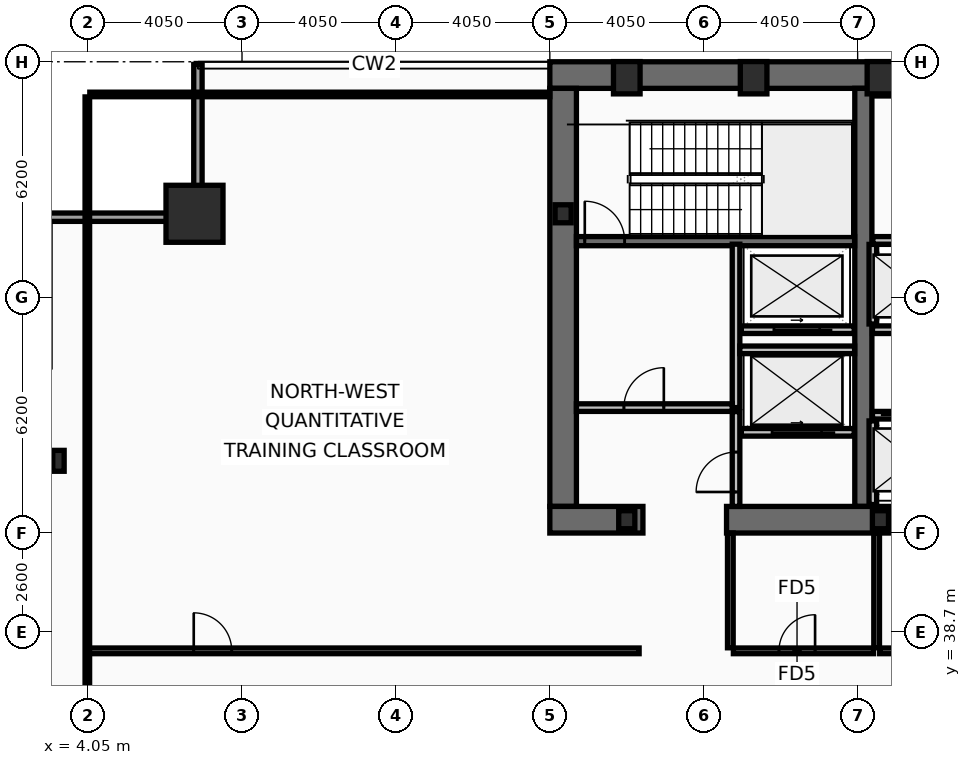
"""IFC4 building model, lengths in metres.
Left out: names, types, materials, properties, quantities, classifications, styles, units other than length and angle.
Written with IfcOpenShell. Run it as: python <this file> out.ifc"""

import sys

from ifc_helpers import new_model, si_unit, direction, frame, frame_2d, origin, origin_2d, place, context, subcontext, project, spatial, rectangle, hollow_rectangle, i_section, extrude, element, fill, save


model = new_model("IFC4")
c1 = context("Model", 3, precision=1e-05, world=origin(), true_north=direction((0.0, 1.0)))
c2 = subcontext(c1, "Body", "Model", "MODEL_VIEW")
j1 = project(units=[si_unit("LENGTHUNIT", "METRE"), si_unit("PLANEANGLEUNIT", "RADIAN")], contexts=[c1])
p1 = place(None, origin())
s1 = spatial("IfcSite", under=j1, at=p1, CompositionType="ELEMENT")
p2 = place(p1, origin())
s2 = spatial("IfcBuilding", under=s1, at=p2, CompositionType="ELEMENT")
p3 = place(p2, frame((0.0, 0.0, 106.6)))
s3 = spatial("IfcBuildingStorey", under=s2, at=p3, CompositionType="ELEMENT", Elevation=106.6)
p4 = place(p3, frame((16.2, 53.35, 0.0), z_axis=(0.0, 0.0, 1.0), x_axis=(1.0, 0.0, 0.0)))
e1 = element("IfcWall", 1, at=p4, inside=s3, PredefinedType="SHEAR", context=c2, shape_type="SweptSolid", body=[
    extrude(rectangle(XDim=40.5, YDim=0.7, at=frame_2d((20.25, 0.0))), origin(), (0.0, 0.0, 1.0), 4.24),
])
p5 = place(p3, frame((16.55, 42.0, 0.0), z_axis=(0.0, 0.0, 1.0), x_axis=(0.0, 1.0, 0.0)))
e2 = element("IfcWall", 2, at=p5, inside=s3, PredefinedType="SHEAR", context=c2, shape_type="SweptSolid", body=[
    extrude(rectangle(XDim=11.0, YDim=0.7, at=frame_2d((5.5, 0.0))), origin(), (0.0, 0.0, 1.0), 4.24),
])
p6 = place(p3, frame((24.45, 42.0, 0.0), z_axis=(0.0, 0.0, 1.0), x_axis=(0.0, 1.0, 0.0)))
e3 = element("IfcWall", 3, at=p6, inside=s3, PredefinedType="SHEAR", context=c2, shape_type="SweptSolid", body=[
    extrude(rectangle(XDim=11.0, YDim=0.45, at=frame_2d((5.5, 0.0))), origin(), (0.0, 0.0, 1.0), 4.24),
])
p7 = place(p3, frame((18.65, 41.65, 0.0), z_axis=(0.0, 0.0, 1.0), x_axis=(-1.0, 0.0, 0.0)))
e4 = element("IfcWall", 4, at=p7, inside=s3, PredefinedType="SHEAR", context=c2, shape_type="SweptSolid", body=[
    extrude(rectangle(XDim=2.45, YDim=0.7, at=frame_2d((1.225, 0.0))), origin(), (0.0, 0.0, 1.0), 4.24),
])
p8 = place(p3, frame((32.3, 41.65, 0.0), z_axis=(0.0, 0.0, 1.0), x_axis=(-1.0, 0.0, 0.0)))
e5 = element("IfcWall", 5, at=p8, inside=s3, PredefinedType="SHEAR", context=c2, shape_type="SweptSolid", body=[
    extrude(rectangle(XDim=11.45, YDim=0.7, at=frame_2d((5.725, 0.0))), origin(), (0.0, 0.0, 1.0), 4.24),
])
p9 = place(p3, frame((16.9, 48.98, 0.0), z_axis=(0.0, 0.0, 1.0), x_axis=(1.0, 0.0, 0.0)))
e6 = element("IfcWall", 6, at=p9, inside=s3, PredefinedType="SHEAR", context=c2, shape_type="SweptSolid", body=[
    extrude(rectangle(XDim=7.32, YDim=0.24, at=frame_2d((3.66, 0.0))), origin(), (0.0, 0.0, 1.0), 4.24),
])
p10 = place(p9, frame((0.22, 0.0, 0.0)))
e7 = element("IfcOpeningElement", 7, at=p10, cuts=e6, PredefinedType="OPENING", context=c2, shape_type="SweptSolid", body=[
    extrude(rectangle(XDim=1.05, YDim=2.15, at=frame_2d((0.525, 1.075))), frame((0.0, 0.13, 0.0), z_axis=(0.0, -1.0, 0.0), x_axis=(1.0, 0.0, 0.0)), (0.0, 0.0, 1.0), 0.26),
])
p11 = place(p3, frame((6.85, 49.7, 0.0), z_axis=(0.0, 0.0, 1.0), x_axis=(1.0, 0.0, 0.0)))
e8 = element("IfcColumn", 8, at=p11, inside=s3, PredefinedType="COLUMN", context=c2, shape_type="SweptSolid", body=[
    extrude(hollow_rectangle(XDim=1.5, YDim=1.5, WallThickness=0.07, at=origin_2d()), origin(), (0.0, 0.0, 1.0), 4.4),
])
for number, where, z_axis, x_axis in (
    (9, (18.225, 53.28, 0.0), (0.0, 0.0, 1.0), (1.0, 0.0, 0.0)),
    (10, (21.562, 53.28, 0.0), (0.0, 0.0, 1.0), (1.0, 0.0, 0.0)),
    (11, (24.9, 53.28, 0.0), (0.0, 0.0, 1.0), (1.0, 0.0, 0.0)),
):
    element("IfcColumn", number, at=place(p3, frame(where, z_axis=z_axis, x_axis=x_axis)), inside=s3, PredefinedType="COLUMN", context=c2, shape_type="SweptSolid", body=[
        extrude(hollow_rectangle(XDim=0.7, YDim=0.85, WallThickness=0.05, at=origin_2d()), origin(), (0.0, 0.0, 1.0), 4.4),
    ])
p12 = place(p3, frame((3.27, 43.2, 0.0), z_axis=(0.0, 0.0, 1.0), x_axis=(1.0, 0.0, 0.0)))
e12 = element("IfcColumn", 12, at=p12, inside=s3, PredefinedType="COLUMN", context=c2, shape_type="SweptSolid", body=[
    extrude(i_section(OverallWidth=0.3, OverallDepth=0.55, WebThickness=0.015, FlangeThickness=0.029, at=origin_2d()), origin(), (0.0, 0.0, 1.0), 4.4),
])
for number, where, z_axis, x_axis in (
    (13, (16.55, 49.7, 0.0), (0.0, 0.0, 1.0), (1.0, 0.0, 0.0)),
    (14, (18.225, 41.65, 0.0), (0.0, 0.0, 1.0), (1.0, 0.0, 0.0)),
    (15, (24.9, 41.65, 0.0), (0.0, 0.0, 1.0), (1.0, 0.0, 0.0)),
):
    element("IfcColumn", number, at=place(p3, frame(where, z_axis=z_axis, x_axis=x_axis)), inside=s3, PredefinedType="COLUMN", context=c2, shape_type="SweptSolid", body=[
        extrude(i_section(OverallWidth=0.424, OverallDepth=0.474, WebThickness=0.048, FlangeThickness=0.077, at=origin_2d()), origin(), (0.0, 0.0, 1.0), 4.4),
    ])
p13 = place(p3, frame((2.83, 49.61, 0.0), z_axis=(0.0, 0.0, 1.0), x_axis=(1.0, 0.0, 0.0)))
e16 = element("IfcWall", 16, at=p13, inside=s3, PredefinedType="SOLIDWALL", context=c2, shape_type="SweptSolid", body=[
    extrude(rectangle(XDim=4.22, YDim=0.22, at=frame_2d((2.11, 0.0))), origin(), (0.0, 0.0, 1.0), 3.63),
])
p14 = place(p3, frame((6.94, 49.72, 0.0), z_axis=(0.0, 0.0, 1.0), x_axis=(0.0, 1.0, 0.0)))
e17 = element("IfcWall", 17, at=p14, inside=s3, PredefinedType="SOLIDWALL", context=c2, shape_type="SweptSolid", body=[
    extrude(rectangle(XDim=3.91, YDim=0.22, at=frame_2d((1.955, 0.0))), origin(), (0.0, 0.0, 1.0), 3.63),
])
p15 = place(p3, frame((24.69, 44.4, 0.0), z_axis=(0.0, 0.0, 1.0), x_axis=(1.0, 0.0, 0.0)))
e18 = element("IfcWall", 18, at=p15, inside=s3, PredefinedType="PARTITIONING", context=c2, shape_type="SweptSolid", body=[
    extrude(rectangle(XDim=6.53, YDim=0.2, at=frame_2d((3.265, 0.0))), origin(), (0.0, 0.0, 1.0), 4.24),
])
p16 = place(p15, frame((0.53, 0.0, 0.0)))
e19 = element("IfcOpeningElement", 19, at=p16, cuts=e18, PredefinedType="OPENING", context=c2, shape_type="SweptSolid", body=[
    extrude(rectangle(XDim=1.1, YDim=2.18, at=frame_2d((0.55, 1.09))), frame((0.0, 0.11, 0.0), z_axis=(0.0, -1.0, 0.0), x_axis=(1.0, 0.0, 0.0)), (0.0, 0.0, 1.0), 0.22),
])
p17 = place(p15, frame((2.69, 0.0, 0.0)))
e20 = element("IfcOpeningElement", 20, at=p17, cuts=e18, PredefinedType="OPENING", context=c2, shape_type="SweptSolid", body=[
    extrude(rectangle(XDim=1.1, YDim=2.18, at=frame_2d((0.55, 1.09))), frame((0.0, 0.11, 0.0), z_axis=(0.0, -1.0, 0.0), x_axis=(1.0, 0.0, 0.0)), (0.0, 0.0, 1.0), 0.22),
])
p18 = place(p15, frame((4.85, 0.0, 0.0)))
e21 = element("IfcOpeningElement", 21, at=p18, cuts=e18, PredefinedType="OPENING", context=c2, shape_type="SweptSolid", body=[
    extrude(rectangle(XDim=1.1, YDim=2.18, at=frame_2d((0.55, 1.09))), frame((0.0, 0.11, 0.0), z_axis=(0.0, -1.0, 0.0), x_axis=(1.0, 0.0, 0.0)), (0.0, 0.0, 1.0), 0.22),
])
p19 = place(p3, frame((24.21, 43.95, 0.0), z_axis=(0.0, 0.0, 1.0), x_axis=(-1.0, 0.0, 0.0)))
e22 = element("IfcWall", 22, at=p19, inside=s3, PredefinedType="PARTITIONING", context=c2, shape_type="SweptSolid", body=[
    extrude(rectangle(XDim=2.97, YDim=0.2, at=frame_2d((1.485, 0.0))), origin(), (0.0, 0.0, 1.0), 4.24),
])
p20 = place(p19, frame((0.86, 0.0, 0.0)))
e23 = element("IfcOpeningElement", 23, at=p20, cuts=e22, PredefinedType="OPENING", context=c2, shape_type="SweptSolid", body=[
    extrude(rectangle(XDim=1.3, YDim=2.18, at=frame_2d((0.65, 1.09))), frame((0.0, 0.11, 0.0), z_axis=(0.0, -1.0, 0.0), x_axis=(1.0, 0.0, 0.0)), (0.0, 0.0, 1.0), 0.22),
])
p21 = place(p3, frame((24.21, 46.65, 0.0), z_axis=(0.0, 0.0, 1.0), x_axis=(-1.0, 0.0, 0.0)))
e24 = element("IfcWall", 24, at=p21, inside=s3, PredefinedType="PARTITIONING", context=c2, shape_type="SweptSolid", body=[
    extrude(rectangle(XDim=2.97, YDim=0.2, at=frame_2d((1.485, 0.0))), origin(), (0.0, 0.0, 1.0), 4.24),
])
p22 = place(p21, frame((0.91, 0.0, 0.0)))
e25 = element("IfcOpeningElement", 25, at=p22, cuts=e24, PredefinedType="OPENING", context=c2, shape_type="SweptSolid", body=[
    extrude(rectangle(XDim=1.2, YDim=2.18, at=frame_2d((0.6, 1.09))), frame((0.0, 0.11, 0.0), z_axis=(0.0, -1.0, 0.0), x_axis=(1.0, 0.0, 0.0)), (0.0, 0.0, 1.0), 0.22),
])
p23 = place(p3, frame((31.22, 46.65, 0.0), z_axis=(0.0, 0.0, 1.0), x_axis=(-1.0, 0.0, 0.0)))
e26 = element("IfcWall", 26, at=p23, inside=s3, PredefinedType="PARTITIONING", context=c2, shape_type="SweptSolid", body=[
    extrude(rectangle(XDim=6.53, YDim=0.2, at=frame_2d((3.265, 0.0))), origin(), (0.0, 0.0, 1.0), 4.24),
])
p24 = place(p23, frame((4.9, 0.0, 0.0)))
e27 = element("IfcOpeningElement", 27, at=p24, cuts=e26, PredefinedType="OPENING", context=c2, shape_type="SweptSolid", body=[
    extrude(rectangle(XDim=1.1, YDim=2.18, at=frame_2d((0.55, 1.09))), frame((0.0, 0.11, 0.0), z_axis=(0.0, -1.0, 0.0), x_axis=(1.0, 0.0, 0.0)), (0.0, 0.0, 1.0), 0.22),
])
p25 = place(p23, frame((2.74, 0.0, 0.0)))
e28 = element("IfcOpeningElement", 28, at=p25, cuts=e26, PredefinedType="OPENING", context=c2, shape_type="SweptSolid", body=[
    extrude(rectangle(XDim=1.1, YDim=2.18, at=frame_2d((0.55, 1.09))), frame((0.0, 0.11, 0.0), z_axis=(0.0, -1.0, 0.0), x_axis=(1.0, 0.0, 0.0)), (0.0, 0.0, 1.0), 0.22),
])
p26 = place(p23, frame((0.58, 0.0, 0.0)))
e29 = element("IfcOpeningElement", 29, at=p26, cuts=e26, PredefinedType="OPENING", context=c2, shape_type="SweptSolid", body=[
    extrude(rectangle(XDim=1.1, YDim=2.18, at=frame_2d((0.55, 1.09))), frame((0.0, 0.11, 0.0), z_axis=(0.0, -1.0, 0.0), x_axis=(1.0, 0.0, 0.0)), (0.0, 0.0, 1.0), 0.22),
])
p27 = place(p3, frame((21.1, 44.6, 0.0), z_axis=(0.0, 0.0, 1.0), x_axis=(0.0, 1.0, 0.0)))
e30 = element("IfcWall", 30, at=p27, inside=s3, PredefinedType="PARTITIONING", context=c2, shape_type="SweptSolid", body=[
    extrude(rectangle(XDim=4.3, YDim=0.2, at=frame_2d((2.15, 0.0))), origin(), (0.0, 0.0, 1.0), 4.24),
])
p28 = place(p3, frame((16.9, 44.6, 0.0), z_axis=(0.0, 0.0, 1.0), x_axis=(1.0, 0.0, 0.0)))
e31 = element("IfcWall", 31, at=p28, inside=s3, PredefinedType="PARTITIONING", context=c2, shape_type="SweptSolid", body=[
    extrude(rectangle(XDim=4.1, YDim=0.2, at=frame_2d((2.05, 0.0))), origin(), (0.0, 0.0, 1.0), 4.24),
])
p29 = place(p28, frame((1.25, 0.0, 0.0)))
e32 = element("IfcOpeningElement", 32, at=p29, cuts=e31, PredefinedType="OPENING", context=c2, shape_type="SweptSolid", body=[
    extrude(rectangle(XDim=1.05, YDim=2.15, at=frame_2d((0.525, 1.075))), frame((0.0, 0.11, 0.0), z_axis=(0.0, -1.0, 0.0), x_axis=(1.0, 0.0, 0.0)), (0.0, 0.0, 1.0), 0.22),
])
p30 = place(p3, frame((21.2, 46.12, 0.0), z_axis=(0.0, 0.0, 1.0), x_axis=(1.0, 0.0, 0.0)))
e33 = element("IfcWall", 33, at=p30, inside=s3, PredefinedType="PARTITIONING", context=c2, shape_type="SweptSolid", body=[
    extrude(rectangle(XDim=3.02, YDim=0.2, at=frame_2d((1.51, 0.0))), origin(), (0.0, 0.0, 1.0), 4.24),
])
p31 = place(p3, frame((21.1, 42.0, 0.0), z_axis=(0.0, 0.0, 1.0), x_axis=(0.0, 1.0, 0.0)))
e34 = element("IfcWall", 34, at=p31, inside=s3, PredefinedType="PARTITIONING", context=c2, shape_type="SweptSolid", body=[
    extrude(rectangle(XDim=2.495, YDim=0.2, at=frame_2d((1.248, 0.0))), origin(), (0.0, 0.0, 1.0), 4.24),
])
p32 = place(p31, frame((0.38, 0.0, 0.0)))
e35 = element("IfcOpeningElement", 35, at=p32, cuts=e34, PredefinedType="OPENING", context=c2, shape_type="SweptSolid", body=[
    extrude(rectangle(XDim=1.05, YDim=2.15, at=frame_2d((0.525, 1.075))), frame((0.0, 0.11, 0.0), z_axis=(0.0, -1.0, 0.0), x_axis=(1.0, 0.0, 0.0)), (0.0, 0.0, 1.0), 0.22),
])
p33 = place(p3, frame((24.7, 46.8, 0.0), z_axis=(0.0, 0.0, 1.0), x_axis=(0.0, 1.0, 0.0)))
e36 = element("IfcWall", 36, at=p33, inside=s3, PredefinedType="PARTITIONING", context=c2, shape_type="SweptSolid", body=[
    extrude(rectangle(XDim=2.095, YDim=0.2, at=frame_2d((1.047, 0.0))), origin(), (0.0, 0.0, 1.0), 4.24),
])
p34 = place(p3, frame((24.7, 42.05, 0.0), z_axis=(0.0, 0.0, 1.0), x_axis=(0.0, 1.0, 0.0)))
e37 = element("IfcWall", 37, at=p34, inside=s3, PredefinedType="PARTITIONING", context=c2, shape_type="SweptSolid", body=[
    extrude(rectangle(XDim=2.2, YDim=0.2, at=frame_2d((1.1, 0.0))), origin(), (0.0, 0.0, 1.0), 4.24),
])
p35 = place(p3, frame((24.7, 52.86, 0.0), z_axis=(0.0, 0.0, 1.0), x_axis=(1.0, 0.0, 0.0)))
e38 = element("IfcWall", 38, at=p35, inside=s3, PredefinedType="PARTITIONING", context=c2, shape_type="SweptSolid", body=[
    extrude(rectangle(XDim=7.72, YDim=0.12, at=frame_2d((3.86, 0.0))), origin(), (0.0, 0.0, 1.0), 4.24),
])
p36 = place(p3, frame((24.7, 49.0, 0.0), z_axis=(0.0, 0.0, 1.0), x_axis=(1.0, 0.0, 0.0)))
e39 = element("IfcWall", 39, at=p36, inside=s3, PredefinedType="PARTITIONING", context=c2, shape_type="SweptSolid", body=[
    extrude(rectangle(XDim=7.72, YDim=0.2, at=frame_2d((3.86, 0.0))), origin(), (0.0, 0.0, 1.0), 4.24),
])
p37 = place(p36, frame((6.56, 0.0, 0.0)))
e40 = element("IfcOpeningElement", 40, at=p37, cuts=e39, PredefinedType="OPENING", context=c2, shape_type="SweptSolid", body=[
    extrude(rectangle(XDim=0.95, YDim=2.1, at=frame_2d((0.475, 1.05))), frame((0.0, 0.11, 0.0), z_axis=(0.0, -1.0, 0.0), x_axis=(1.0, 0.0, 0.0)), (0.0, 0.0, 1.0), 0.22),
])
p38 = place(p3, frame((21.03, 38.2, 0.0), z_axis=(0.0, 0.0, 1.0), x_axis=(1.0, 0.0, 0.0)))
e41 = element("IfcWall", 41, at=p38, inside=s3, PredefinedType="PARTITIONING", context=c2, shape_type="SweptSolid", body=[
    extrude(rectangle(XDim=3.69, YDim=0.15, at=frame_2d((1.845, 0.0))), origin(), (0.0, 0.0, 1.0), 3.53),
])
p39 = place(p38, frame((1.2, 0.0, 0.0)))
e42 = element("IfcOpeningElement", 42, at=p39, cuts=e41, PredefinedType="OPENING", context=c2, shape_type="SweptSolid", body=[
    extrude(rectangle(XDim=0.95, YDim=2.05, at=frame_2d((0.475, 1.025))), frame((0.0, 0.085, 0.0), z_axis=(0.0, -1.0, 0.0), x_axis=(1.0, 0.0, 0.0)), (0.0, 0.0, 1.0), 0.17),
])
p40 = place(p3, frame((24.88, 38.2, 0.0), z_axis=(0.0, 0.0, 1.0), x_axis=(1.0, 0.0, 0.0)))
e43 = element("IfcWall", 43, at=p40, inside=s3, PredefinedType="PARTITIONING", context=c2, shape_type="SweptSolid", body=[
    extrude(rectangle(XDim=4.04, YDim=0.15, at=frame_2d((2.02, 0.0))), origin(), (0.0, 0.0, 1.0), 3.53),
])
p41 = place(p40, frame((1.3, 0.0, 0.0)))
e44 = element("IfcOpeningElement", 44, at=p41, cuts=e43, PredefinedType="OPENING", context=c2, shape_type="SweptSolid", body=[
    extrude(rectangle(XDim=0.95, YDim=2.05, at=frame_2d((0.475, 1.025))), frame((0.0, 0.085, 0.0), z_axis=(0.0, -1.0, 0.0), x_axis=(1.0, 0.0, 0.0)), (0.0, 0.0, 1.0), 0.17),
])
p42 = place(p3, frame((20.95, 38.28, 0.0), z_axis=(0.0, 0.0, 1.0), x_axis=(0.0, 1.0, 0.0)))
e45 = element("IfcWall", 45, at=p42, inside=s3, PredefinedType="PARTITIONING", context=c2, shape_type="SweptSolid", body=[
    extrude(rectangle(XDim=3.02, YDim=0.15, at=frame_2d((1.51, 0.0))), origin(), (0.0, 0.0, 1.0), 4.24),
])
p43 = place(p3, frame((24.8, 38.28, 0.0), z_axis=(0.0, 0.0, 1.0), x_axis=(0.0, 1.0, 0.0)))
e46 = element("IfcWall", 46, at=p43, inside=s3, PredefinedType="PARTITIONING", context=c2, shape_type="SweptSolid", body=[
    extrude(rectangle(XDim=3.02, YDim=0.15, at=frame_2d((1.51, 0.0))), origin(), (0.0, 0.0, 1.0), 3.53),
])
p44 = place(p3, frame((4.03, 38.2, 0.0), z_axis=(0.0, 0.0, 1.0), x_axis=(1.0, 0.0, 0.0)))
e47 = element("IfcWall", 47, at=p44, inside=s3, PredefinedType="PARTITIONING", context=c2, shape_type="SweptSolid", body=[
    extrude(rectangle(XDim=14.52, YDim=0.15, at=frame_2d((7.26, 0.0))), origin(), (0.0, 0.0, 1.0), 3.53),
])
p45 = place(p44, frame((2.8, 0.0, 0.0)))
e48 = element("IfcOpeningElement", 48, at=p45, cuts=e47, PredefinedType="OPENING", context=c2, shape_type="SweptSolid", body=[
    extrude(rectangle(XDim=1.0, YDim=2.05, at=frame_2d((0.5, 1.025))), frame((0.0, 0.085, 0.0), z_axis=(0.0, -1.0, 0.0), x_axis=(1.0, 0.0, 0.0)), (0.0, 0.0, 1.0), 0.17),
])
p46 = place(p3, frame((4.03, 10.665, 0.0), z_axis=(0.0, 0.0, 1.0), x_axis=(0.0, 1.0, 0.0)))
e49 = element("IfcWall", 49, at=p46, inside=s3, PredefinedType="PARTITIONING", context=c2, shape_type="SweptSolid", body=[
    extrude(rectangle(XDim=42.11, YDim=0.12, at=frame_2d((21.055, 0.0))), origin(), (0.0, 0.0, 1.0), 3.53),
])
p47 = place(p3, frame((4.095, 52.84, 0.0), z_axis=(0.0, 0.0, 1.0), x_axis=(1.0, 0.0, 0.0)))
e50 = element("IfcWall", 50, at=p47, inside=s3, PredefinedType="PARTITIONING", context=c2, shape_type="SweptSolid", body=[
    extrude(rectangle(XDim=12.105, YDim=0.12, at=frame_2d((6.052, 0.0))), origin(), (0.0, 0.0, 1.0), 4.24),
])
p48 = place(p10, origin())
e51 = element("IfcDoor", 51, at=p48, inside=s3, OperationType="SINGLE_SWING_LEFT", PredefinedType="DOOR", context=c2, shape_type="SweptSolid", body=[
    extrude(rectangle(XDim=1.05, YDim=2.15, at=frame_2d((0.525, 1.075))), frame((0.0, 0.025, 0.0), z_axis=(0.0, -1.0, 0.0), x_axis=(1.0, 0.0, 0.0)), (0.0, 0.0, 1.0), 0.05),
])
fill(e7, e51)
p49 = place(p20, origin())
e52 = element("IfcDoor", 52, at=p49, inside=s3, OperationType="SLIDING_TO_LEFT", PredefinedType="DOOR", context=c2, shape_type="SweptSolid", body=[
    extrude(rectangle(XDim=1.3, YDim=2.18, at=frame_2d((0.65, 1.09))), frame((0.0, 0.025, 0.0), z_axis=(0.0, -1.0, 0.0), x_axis=(1.0, 0.0, 0.0)), (0.0, 0.0, 1.0), 0.05),
])
fill(e23, e52)
p50 = place(p22, origin())
e53 = element("IfcDoor", 53, at=p50, inside=s3, OperationType="SLIDING_TO_LEFT", PredefinedType="DOOR", context=c2, shape_type="SweptSolid", body=[
    extrude(rectangle(XDim=1.2, YDim=2.18, at=frame_2d((0.6, 1.09))), frame((0.0, 0.025, 0.0), z_axis=(0.0, -1.0, 0.0), x_axis=(1.0, 0.0, 0.0)), (0.0, 0.0, 1.0), 0.05),
])
fill(e25, e53)
p51 = place(p29, origin())
e54 = element("IfcDoor", 54, at=p51, inside=s3, OperationType="SINGLE_SWING_RIGHT", PredefinedType="DOOR", context=c2, shape_type="SweptSolid", body=[
    extrude(rectangle(XDim=1.05, YDim=2.15, at=frame_2d((0.525, 1.075))), frame((0.0, 0.025, 0.0), z_axis=(0.0, -1.0, 0.0), x_axis=(1.0, 0.0, 0.0)), (0.0, 0.0, 1.0), 0.05),
])
fill(e32, e54)
p52 = place(p32, origin())
e55 = element("IfcDoor", 55, at=p52, inside=s3, OperationType="SINGLE_SWING_LEFT", PredefinedType="DOOR", context=c2, shape_type="SweptSolid", body=[
    extrude(rectangle(XDim=1.05, YDim=2.15, at=frame_2d((0.525, 1.075))), frame((0.0, 0.025, 0.0), z_axis=(0.0, -1.0, 0.0), x_axis=(1.0, 0.0, 0.0)), (0.0, 0.0, 1.0), 0.05),
])
fill(e35, e55)
p53 = place(p39, origin())
e56 = element("IfcDoor", 56, at=p53, inside=s3, OperationType="SINGLE_SWING_RIGHT", PredefinedType="DOOR", context=c2, shape_type="SweptSolid", body=[
    extrude(rectangle(XDim=0.95, YDim=2.05, at=frame_2d((0.475, 1.025))), frame((0.0, 0.025, 0.0), z_axis=(0.0, -1.0, 0.0), x_axis=(1.0, 0.0, 0.0)), (0.0, 0.0, 1.0), 0.05),
])
fill(e42, e56)
p54 = place(p45, origin())
e57 = element("IfcDoor", 57, at=p54, inside=s3, OperationType="SINGLE_SWING_LEFT", PredefinedType="DOOR", context=c2, shape_type="SweptSolid", body=[
    extrude(rectangle(XDim=1.0, YDim=2.05, at=frame_2d((0.5, 1.025))), frame((0.0, 0.025, 0.0), z_axis=(0.0, -1.0, 0.0), x_axis=(1.0, 0.0, 0.0)), (0.0, 0.0, 1.0), 0.05),
])
fill(e48, e57)
save(model, sys.argv[1])
